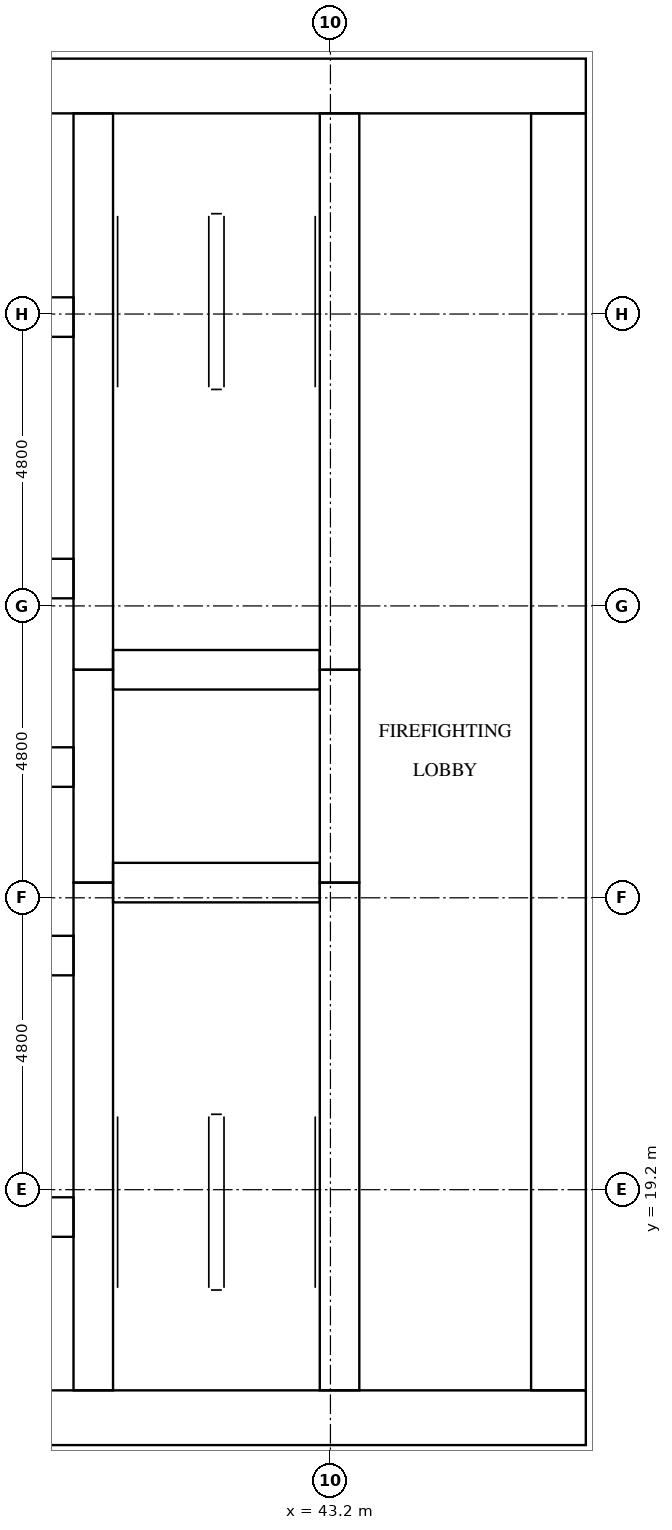
"""IFC4 building model, lengths in metres.
Left out: names, types, materials, properties, quantities, classifications, styles, units other than length and angle.
Written with IfcOpenShell. Run it as: python <this file> out.ifc"""

import sys

from ifc_helpers import new_model, si_unit, direction, frame, frame_2d, origin, place, context, subcontext, project, spatial, rectangle, extrude, element, fill, save


model = new_model("IFC4")
c1 = context("Model", 3, precision=1e-05, world=origin(), true_north=direction((0.0, 1.0)))
c2 = subcontext(c1, "Body", "Model", "MODEL_VIEW")
j1 = project(units=[si_unit("LENGTHUNIT", "METRE"), si_unit("PLANEANGLEUNIT", "RADIAN")], contexts=[c1])
p1 = place(None, origin())
s1 = spatial("IfcSite", under=j1, at=p1, CompositionType="ELEMENT")
p2 = place(p1, origin())
s2 = spatial("IfcBuilding", under=s1, at=p2, CompositionType="ELEMENT")
p3 = place(p2, frame((0.0, 0.0, 99.7)))
s3 = spatial("IfcBuildingStorey", under=s2, at=p3, CompositionType="ELEMENT", Elevation=99.7)
p4 = place(p3, frame((15.0, 15.45, 0.0), z_axis=(0.0, 0.0, 1.0), x_axis=(1.0, 0.0, 0.0)))
e1 = element("IfcWall", 1, at=p4, inside=s3, PredefinedType="SHEAR", context=c2, shape_type="SweptSolid", body=[
    extrude(rectangle(XDim=32.4, YDim=0.9, at=frame_2d((16.2, 0.0))), origin(), (0.0, 0.0, 1.0), 3.2),
])
p5 = place(p4, frame((15.3, 0.0, 0.0)))
e2 = element("IfcOpeningElement", 2, at=p5, cuts=e1, PredefinedType="OPENING", context=c2, shape_type="SweptSolid", body=[
    extrude(rectangle(XDim=1.8, YDim=2.1, at=frame_2d((0.9, 1.05))), frame((0.0, 0.46, 0.0), z_axis=(0.0, -1.0, 0.0), x_axis=(1.0, 0.0, 0.0)), (0.0, 0.0, 1.0), 0.92),
])
p6 = place(p3, frame((15.0, 37.35, 0.0), z_axis=(0.0, 0.0, 1.0), x_axis=(1.0, 0.0, 0.0)))
e3 = element("IfcWall", 3, at=p6, inside=s3, PredefinedType="SHEAR", context=c2, shape_type="SweptSolid", body=[
    extrude(rectangle(XDim=32.4, YDim=0.9, at=frame_2d((16.2, 0.0))), origin(), (0.0, 0.0, 1.0), 3.2),
])
p7 = place(p6, frame((15.3, 0.0, 0.0)))
e4 = element("IfcOpeningElement", 4, at=p7, cuts=e3, PredefinedType="OPENING", context=c2, shape_type="SweptSolid", body=[
    extrude(rectangle(XDim=1.8, YDim=2.1, at=frame_2d((0.9, 1.05))), frame((0.0, 0.46, 0.0), z_axis=(0.0, -1.0, 0.0), x_axis=(1.0, 0.0, 0.0)), (0.0, 0.0, 1.0), 0.92),
])
p8 = place(p6, frame((1.794, 0.0, 0.0)))
e5 = element("IfcOpeningElement", 5, at=p8, cuts=e3, PredefinedType="OPENING", context=c2, shape_type="SweptSolid", body=[
    extrude(rectangle(XDim=1.0, YDim=2.1, at=frame_2d((0.5, 1.05))), frame((0.0, 0.46, 0.0), z_axis=(0.0, -1.0, 0.0), x_axis=(1.0, 0.0, 0.0)), (0.0, 0.0, 1.0), 0.92),
])
p9 = place(p6, frame((5.331, 0.0, 0.0)))
e6 = element("IfcOpeningElement", 6, at=p9, cuts=e3, PredefinedType="OPENING", context=c2, shape_type="SweptSolid", body=[
    extrude(rectangle(XDim=1.0, YDim=2.1, at=frame_2d((0.5, 1.05))), frame((0.0, 0.46, 0.0), z_axis=(0.0, -1.0, 0.0), x_axis=(1.0, 0.0, 0.0)), (0.0, 0.0, 1.0), 0.92),
])
p10 = place(p3, frame((46.95, 15.9, 0.0), z_axis=(0.0, 0.0, 1.0), x_axis=(0.0, 1.0, 0.0)))
e7 = element("IfcWall", 7, at=p10, inside=s3, PredefinedType="SHEAR", context=c2, shape_type="SweptSolid", body=[
    extrude(rectangle(XDim=21.0, YDim=0.9, at=frame_2d((10.5, 0.0))), origin(), (0.0, 0.0, 1.0), 3.2),
])
p11 = place(p10, frame((10.2, 0.0, 0.0)))
e8 = element("IfcOpeningElement", 8, at=p11, cuts=e7, PredefinedType="OPENING", context=c2, shape_type="SweptSolid", body=[
    extrude(rectangle(XDim=1.2, YDim=2.1, at=frame_2d((0.6, 1.05))), frame((0.0, 0.46, 0.0), z_axis=(0.0, -1.0, 0.0), x_axis=(1.0, 0.0, 0.0)), (0.0, 0.0, 1.0), 0.92),
])
p12 = place(p3, frame((39.3, 15.9, 0.0), z_axis=(0.0, 0.0, 1.0), x_axis=(0.0, 1.0, 0.0)))
e9 = element("IfcWall", 9, at=p12, inside=s3, PredefinedType="SHEAR", context=c2, shape_type="SweptSolid", body=[
    extrude(rectangle(XDim=8.35, YDim=0.65, at=frame_2d((4.175, 0.0))), origin(), (0.0, 0.0, 1.0), 3.2),
])
p13 = place(p3, frame((39.3, 24.25, 0.0), z_axis=(0.0, 0.0, 1.0), x_axis=(0.0, 1.0, 0.0)))
e10 = element("IfcWall", 10, at=p13, inside=s3, PredefinedType="SHEAR", context=c2, shape_type="SweptSolid", body=[
    extrude(rectangle(XDim=3.5, YDim=0.65, at=frame_2d((1.75, 0.0))), origin(), (0.0, 0.0, 1.0), 3.2),
])
p14 = place(p3, frame((39.3, 27.75, 0.0), z_axis=(0.0, 0.0, 1.0), x_axis=(0.0, 1.0, 0.0)))
e11 = element("IfcWall", 11, at=p14, inside=s3, PredefinedType="SHEAR", context=c2, shape_type="SweptSolid", body=[
    extrude(rectangle(XDim=9.15, YDim=0.65, at=frame_2d((4.575, 0.0))), origin(), (0.0, 0.0, 1.0), 3.2),
])
p15 = place(p3, frame((43.35, 15.9, 0.0), z_axis=(0.0, 0.0, 1.0), x_axis=(0.0, 1.0, 0.0)))
e12 = element("IfcWall", 12, at=p15, inside=s3, PredefinedType="SHEAR", context=c2, shape_type="SweptSolid", body=[
    extrude(rectangle(XDim=8.35, YDim=0.65, at=frame_2d((4.175, 0.0))), origin(), (0.0, 0.0, 1.0), 3.2),
])
p16 = place(p15, frame((0.3, 0.0, 0.0)))
e13 = element("IfcOpeningElement", 13, at=p16, cuts=e12, PredefinedType="OPENING", context=c2, shape_type="SweptSolid", body=[
    extrude(rectangle(XDim=1.2, YDim=2.1, at=frame_2d((0.6, 1.05))), frame((0.0, 0.335, 0.0), z_axis=(0.0, -1.0, 0.0), x_axis=(1.0, 0.0, 0.0)), (0.0, 0.0, 1.0), 0.67),
])
p17 = place(p3, frame((43.35, 24.25, 0.0), z_axis=(0.0, 0.0, 1.0), x_axis=(0.0, 1.0, 0.0)))
e14 = element("IfcWall", 14, at=p17, inside=s3, PredefinedType="SHEAR", context=c2, shape_type="SweptSolid", body=[
    extrude(rectangle(XDim=3.5, YDim=0.65, at=frame_2d((1.75, 0.0))), origin(), (0.0, 0.0, 1.0), 3.2),
])
p18 = place(p17, frame((1.2, 0.0, 0.0)))
e15 = element("IfcOpeningElement", 15, at=p18, cuts=e14, PredefinedType="OPENING", context=c2, shape_type="SweptSolid", body=[
    extrude(rectangle(XDim=1.1, YDim=2.1, at=frame_2d((0.55, 1.05))), frame((0.0, 0.335, 0.0), z_axis=(0.0, -1.0, 0.0), x_axis=(1.0, 0.0, 0.0)), (0.0, 0.0, 1.0), 0.67),
])
p19 = place(p3, frame((43.35, 27.75, 0.0), z_axis=(0.0, 0.0, 1.0), x_axis=(0.0, 1.0, 0.0)))
e16 = element("IfcWall", 16, at=p19, inside=s3, PredefinedType="SHEAR", context=c2, shape_type="SweptSolid", body=[
    extrude(rectangle(XDim=9.15, YDim=0.65, at=frame_2d((4.575, 0.0))), origin(), (0.0, 0.0, 1.0), 3.2),
])
p20 = place(p19, frame((7.65, 0.0, 0.0)))
e17 = element("IfcOpeningElement", 17, at=p20, cuts=e16, PredefinedType="OPENING", context=c2, shape_type="SweptSolid", body=[
    extrude(rectangle(XDim=1.2, YDim=2.1, at=frame_2d((0.6, 1.05))), frame((0.0, 0.335, 0.0), z_axis=(0.0, -1.0, 0.0), x_axis=(1.0, 0.0, 0.0)), (0.0, 0.0, 1.0), 0.67),
])
for number, where, z_axis, x_axis in (
    (18, (39.625, 24.25, 0.0), (0.0, 0.0, 1.0), (1.0, 0.0, 0.0)),
    (19, (39.625, 27.75, 0.0), (0.0, 0.0, 1.0), (1.0, 0.0, 0.0)),
):
    element("IfcWall", number, at=place(p3, frame(where, z_axis=z_axis, x_axis=x_axis)), inside=s3, PredefinedType="SHEAR", context=c2, shape_type="SweptSolid", body=[
        extrude(rectangle(XDim=3.4, YDim=0.65, at=frame_2d((1.7, 0.0))), origin(), (0.0, 0.0, 1.0), 3.2),
    ])
p21 = place(p3, frame((33.375, 18.75, 0.0), z_axis=(0.0, 0.0, 1.0), x_axis=(1.0, 0.0, 0.0)))
e20 = element("IfcWall", 20, at=p21, inside=s3, PredefinedType="SHEAR", context=c2, shape_type="SweptSolid", body=[
    extrude(rectangle(XDim=5.6, YDim=0.65, at=frame_2d((2.8, 0.0))), origin(), (0.0, 0.0, 1.0), 3.2),
])
p22 = place(p21, frame((1.288, 0.0, 0.0)))
e21 = element("IfcOpeningElement", 21, at=p22, cuts=e20, PredefinedType="OPENING", context=c2, shape_type="SweptSolid", body=[
    extrude(rectangle(XDim=1.1, YDim=2.1, at=frame_2d((0.55, 1.05))), frame((0.0, 0.335, 0.0), z_axis=(0.0, -1.0, 0.0), x_axis=(1.0, 0.0, 0.0)), (0.0, 0.0, 1.0), 0.67),
])
p23 = place(p21, frame((3.863, 0.0, 0.0)))
e22 = element("IfcOpeningElement", 22, at=p23, cuts=e20, PredefinedType="OPENING", context=c2, shape_type="SweptSolid", body=[
    extrude(rectangle(XDim=1.1, YDim=2.1, at=frame_2d((0.55, 1.05))), frame((0.0, 0.335, 0.0), z_axis=(0.0, -1.0, 0.0), x_axis=(1.0, 0.0, 0.0)), (0.0, 0.0, 1.0), 0.67),
])
p24 = place(p3, frame((23.425, 23.05, 0.0), z_axis=(0.0, 0.0, 1.0), x_axis=(1.0, 0.0, 0.0)))
e23 = element("IfcWall", 23, at=p24, inside=s3, PredefinedType="SHEAR", context=c2, shape_type="SweptSolid", body=[
    extrude(rectangle(XDim=15.55, YDim=0.65, at=frame_2d((7.775, 0.0))), origin(), (0.0, 0.0, 1.0), 3.2),
])
p25 = place(p24, frame((0.309, 0.0, 0.0)))
e24 = element("IfcOpeningElement", 24, at=p25, cuts=e23, PredefinedType="OPENING", context=c2, shape_type="SweptSolid", body=[
    extrude(rectangle(XDim=1.0, YDim=2.1, at=frame_2d((0.5, 1.05))), frame((0.0, 0.335, 0.0), z_axis=(0.0, -1.0, 0.0), x_axis=(1.0, 0.0, 0.0)), (0.0, 0.0, 1.0), 0.67),
])
p26 = place(p24, frame((2.934, 0.0, 0.0)))
e25 = element("IfcOpeningElement", 25, at=p26, cuts=e23, PredefinedType="OPENING", context=c2, shape_type="SweptSolid", body=[
    extrude(rectangle(XDim=1.0, YDim=2.1, at=frame_2d((0.5, 1.05))), frame((0.0, 0.335, 0.0), z_axis=(0.0, -1.0, 0.0), x_axis=(1.0, 0.0, 0.0)), (0.0, 0.0, 1.0), 0.67),
])
p27 = place(p24, frame((10.809, 0.0, 0.0)))
e26 = element("IfcOpeningElement", 26, at=p27, cuts=e23, PredefinedType="OPENING", context=c2, shape_type="SweptSolid", body=[
    extrude(rectangle(XDim=1.0, YDim=2.1, at=frame_2d((0.5, 1.05))), frame((0.0, 0.335, 0.0), z_axis=(0.0, -1.0, 0.0), x_axis=(1.0, 0.0, 0.0)), (0.0, 0.0, 1.0), 0.67),
])
p28 = place(p24, frame((13.434, 0.0, 0.0)))
e27 = element("IfcOpeningElement", 27, at=p28, cuts=e23, PredefinedType="OPENING", context=c2, shape_type="SweptSolid", body=[
    extrude(rectangle(XDim=1.0, YDim=2.1, at=frame_2d((0.5, 1.05))), frame((0.0, 0.335, 0.0), z_axis=(0.0, -1.0, 0.0), x_axis=(1.0, 0.0, 0.0)), (0.0, 0.0, 1.0), 0.67),
])
p29 = place(p3, frame((23.425, 26.15, 0.0), z_axis=(0.0, 0.0, 1.0), x_axis=(1.0, 0.0, 0.0)))
e28 = element("IfcWall", 28, at=p29, inside=s3, PredefinedType="SHEAR", context=c2, shape_type="SweptSolid", body=[
    extrude(rectangle(XDim=15.55, YDim=0.65, at=frame_2d((7.775, 0.0))), origin(), (0.0, 0.0, 1.0), 3.2),
])
p30 = place(p3, frame((23.425, 29.25, 0.0), z_axis=(0.0, 0.0, 1.0), x_axis=(1.0, 0.0, 0.0)))
e29 = element("IfcWall", 29, at=p30, inside=s3, PredefinedType="SHEAR", context=c2, shape_type="SweptSolid", body=[
    extrude(rectangle(XDim=15.55, YDim=0.65, at=frame_2d((7.775, 0.0))), origin(), (0.0, 0.0, 1.0), 3.2),
])
p31 = place(p30, frame((2.508, 0.0, 0.0)))
e30 = element("IfcOpeningElement", 30, at=p31, cuts=e29, PredefinedType="OPENING", context=c2, shape_type="SweptSolid", body=[
    extrude(rectangle(XDim=1.0, YDim=2.1, at=frame_2d((0.5, 1.05))), frame((0.0, 0.335, 0.0), z_axis=(0.0, -1.0, 0.0), x_axis=(1.0, 0.0, 0.0)), (0.0, 0.0, 1.0), 0.67),
])
p32 = place(p30, frame((7.275, 0.0, 0.0)))
e31 = element("IfcOpeningElement", 31, at=p32, cuts=e29, PredefinedType="OPENING", context=c2, shape_type="SweptSolid", body=[
    extrude(rectangle(XDim=1.0, YDim=2.1, at=frame_2d((0.5, 1.05))), frame((0.0, 0.335, 0.0), z_axis=(0.0, -1.0, 0.0), x_axis=(1.0, 0.0, 0.0)), (0.0, 0.0, 1.0), 0.67),
])
p33 = place(p30, frame((12.042, 0.0, 0.0)))
e32 = element("IfcOpeningElement", 32, at=p33, cuts=e29, PredefinedType="OPENING", context=c2, shape_type="SweptSolid", body=[
    extrude(rectangle(XDim=1.0, YDim=2.1, at=frame_2d((0.5, 1.05))), frame((0.0, 0.335, 0.0), z_axis=(0.0, -1.0, 0.0), x_axis=(1.0, 0.0, 0.0)), (0.0, 0.0, 1.0), 0.67),
])
p34 = place(p3, frame((33.375, 33.55, 0.0), z_axis=(0.0, 0.0, 1.0), x_axis=(1.0, 0.0, 0.0)))
e33 = element("IfcWall", 33, at=p34, inside=s3, PredefinedType="SHEAR", context=c2, shape_type="SweptSolid", body=[
    extrude(rectangle(XDim=5.6, YDim=0.65, at=frame_2d((2.8, 0.0))), origin(), (0.0, 0.0, 1.0), 3.2),
])
p35 = place(p18, origin())
e34 = element("IfcDoor", 34, at=p35, inside=s3, OperationType="DOUBLE_DOOR_SLIDING", PredefinedType="DOOR", context=c2, shape_type="SweptSolid", body=[
    extrude(rectangle(XDim=1.1, YDim=2.1, at=frame_2d((0.55, 1.05))), frame((0.0, 0.025, 0.0), z_axis=(0.0, -1.0, 0.0), x_axis=(1.0, 0.0, 0.0)), (0.0, 0.0, 1.0), 0.05),
])
fill(e15, e34)
p36 = place(p16, origin())
e35 = element("IfcDoor", 35, at=p36, inside=s3, OperationType="SINGLE_SWING_RIGHT", PredefinedType="DOOR", context=c2, shape_type="SweptSolid", body=[
    extrude(rectangle(XDim=1.2, YDim=2.1, at=frame_2d((0.6, 1.05))), frame((0.0, 0.025, 0.0), z_axis=(0.0, -1.0, 0.0), x_axis=(1.0, 0.0, 0.0)), (0.0, 0.0, 1.0), 0.05),
])
fill(e13, e35)
p37 = place(p20, origin())
e36 = element("IfcDoor", 36, at=p37, inside=s3, OperationType="SINGLE_SWING_LEFT", PredefinedType="DOOR", context=c2, shape_type="SweptSolid", body=[
    extrude(rectangle(XDim=1.2, YDim=2.1, at=frame_2d((0.6, 1.05))), frame((0.0, 0.025, 0.0), z_axis=(0.0, -1.0, 0.0), x_axis=(1.0, 0.0, 0.0)), (0.0, 0.0, 1.0), 0.05),
])
fill(e17, e36)
p38 = place(p11, origin())
e37 = element("IfcDoor", 37, at=p38, inside=s3, OperationType="SINGLE_SWING_LEFT", PredefinedType="DOOR", context=c2, shape_type="SweptSolid", body=[
    extrude(rectangle(XDim=1.2, YDim=2.1, at=frame_2d((0.6, 1.05))), frame((0.0, 0.025, 0.0), z_axis=(0.0, -1.0, 0.0), x_axis=(1.0, 0.0, 0.0)), (0.0, 0.0, 1.0), 0.05),
])
fill(e8, e37)
save(model, sys.argv[1])
